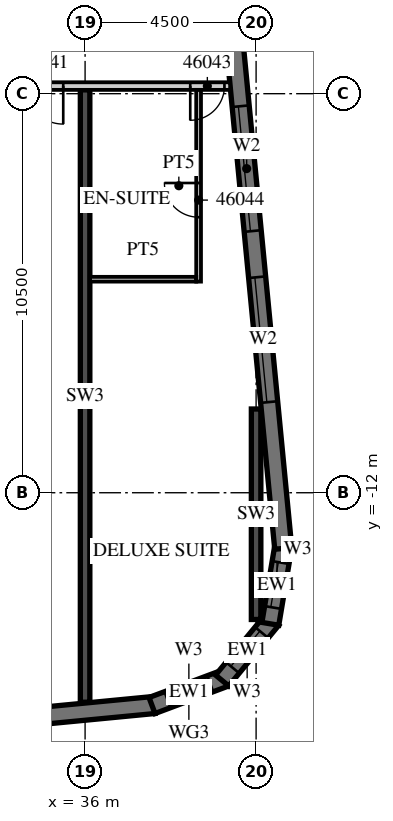
"""IFC4 building model, lengths in metres.
Left out: names, types, materials, properties, quantities, classifications, styles, units other than length and angle.
Written with IfcOpenShell. Run it as: python <this file> out.ifc"""

import sys

from ifc_helpers import new_model, si_unit, direction, frame, frame_2d, origin, place, context, subcontext, project, spatial, polyline, rectangle, outline, extrude, element, fill, save


model = new_model("IFC4")
c1 = context("Model", 3, precision=1e-05, world=origin(), true_north=direction((0.0, 1.0)))
c2 = subcontext(c1, "Body", "Model", "MODEL_VIEW")
j1 = project(units=[si_unit("LENGTHUNIT", "METRE"), si_unit("PLANEANGLEUNIT", "RADIAN")], contexts=[c1])
p1 = place(None, origin())
s1 = spatial("IfcSite", under=j1, at=p1, CompositionType="ELEMENT")
p2 = place(p1, origin())
s2 = spatial("IfcBuilding", under=s1, at=p2, CompositionType="ELEMENT")
p3 = place(p2, frame((0.0, 0.0, 193.3)))
s3 = spatial("IfcBuildingStorey", under=s2, at=p3, CompositionType="ELEMENT", Elevation=193.3)
p4 = place(p3, frame((36.0, -17.512, 0.0), z_axis=(0.0, 0.0, 1.0), x_axis=(0.0, 1.0, 0.0)))
e1 = element("IfcWall", 1, at=p4, inside=s3, PredefinedType="SHEAR", context=c2, shape_type="SweptSolid", body=[
    extrude(rectangle(XDim=16.112, YDim=0.25, at=frame_2d((8.056, 0.0))), origin(), (0.0, 0.0, 1.0), 3.3),
])
p5 = place(p3, frame((40.5, -15.335, 0.0), z_axis=(0.0, 0.0, 1.0), x_axis=(0.0, 1.0, 0.0)))
e2 = element("IfcWall", 2, at=p5, inside=s3, PredefinedType="SHEAR", context=c2, shape_type="SweptSolid", body=[
    extrude(rectangle(XDim=5.538, YDim=0.25, at=frame_2d((2.769, 0.0))), origin(), (0.0, 0.0, 1.0), 3.3),
])
p6 = place(p3, frame((-13.521, -22.529, 0.0), z_axis=(0.0, 0.0, 1.0), x_axis=(0.995396436651, 0.095843277819, 0.0)))
e3 = element("IfcWall", 3, at=p6, inside=s3, PredefinedType="SOLIDWALL", context=c2, shape_type="SweptSolid", body=[
    extrude(rectangle(XDim=51.578, YDim=0.45, at=frame_2d((25.789, 0.0))), origin(), (0.0, 0.0, 1.0), 3.02),
])
p7 = place(p6, frame((0.91, 0.0, 0.45)))
e4 = element("IfcOpeningElement", 4, at=p7, cuts=e3, PredefinedType="OPENING", context=c2, shape_type="SweptSolid", body=[
    extrude(rectangle(XDim=2.7, YDim=2.25, at=frame_2d((1.35, 1.125))), frame((0.0, 0.235, 0.0), z_axis=(0.0, -1.0, 0.0), x_axis=(1.0, 0.0, 0.0)), (0.0, 0.0, 1.0), 0.47),
])
p8 = place(p6, frame((5.431, 0.0, 0.45)))
e5 = element("IfcOpeningElement", 5, at=p8, cuts=e3, PredefinedType="OPENING", context=c2, shape_type="SweptSolid", body=[
    extrude(rectangle(XDim=2.7, YDim=2.25, at=frame_2d((1.35, 1.125))), frame((0.0, 0.235, 0.0), z_axis=(0.0, -1.0, 0.0), x_axis=(1.0, 0.0, 0.0)), (0.0, 0.0, 1.0), 0.47),
])
p9 = place(p6, frame((9.952, 0.0, 0.45)))
e6 = element("IfcOpeningElement", 6, at=p9, cuts=e3, PredefinedType="OPENING", context=c2, shape_type="SweptSolid", body=[
    extrude(rectangle(XDim=2.7, YDim=2.25, at=frame_2d((1.35, 1.125))), frame((0.0, 0.235, 0.0), z_axis=(0.0, -1.0, 0.0), x_axis=(1.0, 0.0, 0.0)), (0.0, 0.0, 1.0), 0.47),
])
p10 = place(p6, frame((14.473, 0.0, 0.45)))
e7 = element("IfcOpeningElement", 7, at=p10, cuts=e3, PredefinedType="OPENING", context=c2, shape_type="SweptSolid", body=[
    extrude(rectangle(XDim=2.7, YDim=2.25, at=frame_2d((1.35, 1.125))), frame((0.0, 0.235, 0.0), z_axis=(0.0, -1.0, 0.0), x_axis=(1.0, 0.0, 0.0)), (0.0, 0.0, 1.0), 0.47),
])
p11 = place(p6, frame((18.994, 0.0, 0.45)))
e8 = element("IfcOpeningElement", 8, at=p11, cuts=e3, PredefinedType="OPENING", context=c2, shape_type="SweptSolid", body=[
    extrude(rectangle(XDim=2.7, YDim=2.25, at=frame_2d((1.35, 1.125))), frame((0.0, 0.235, 0.0), z_axis=(0.0, -1.0, 0.0), x_axis=(1.0, 0.0, 0.0)), (0.0, 0.0, 1.0), 0.47),
])
p12 = place(p6, frame((23.514, 0.0, 0.45)))
e9 = element("IfcOpeningElement", 9, at=p12, cuts=e3, PredefinedType="OPENING", context=c2, shape_type="SweptSolid", body=[
    extrude(rectangle(XDim=2.7, YDim=2.25, at=frame_2d((1.35, 1.125))), frame((0.0, 0.235, 0.0), z_axis=(0.0, -1.0, 0.0), x_axis=(1.0, 0.0, 0.0)), (0.0, 0.0, 1.0), 0.47),
])
p13 = place(p6, frame((28.035, 0.0, 0.45)))
e10 = element("IfcOpeningElement", 10, at=p13, cuts=e3, PredefinedType="OPENING", context=c2, shape_type="SweptSolid", body=[
    extrude(rectangle(XDim=2.7, YDim=2.25, at=frame_2d((1.35, 1.125))), frame((0.0, 0.235, 0.0), z_axis=(0.0, -1.0, 0.0), x_axis=(1.0, 0.0, 0.0)), (0.0, 0.0, 1.0), 0.47),
])
p14 = place(p6, frame((32.556, 0.0, 0.45)))
e11 = element("IfcOpeningElement", 11, at=p14, cuts=e3, PredefinedType="OPENING", context=c2, shape_type="SweptSolid", body=[
    extrude(rectangle(XDim=2.7, YDim=2.25, at=frame_2d((1.35, 1.125))), frame((0.0, 0.235, 0.0), z_axis=(0.0, -1.0, 0.0), x_axis=(1.0, 0.0, 0.0)), (0.0, 0.0, 1.0), 0.47),
])
p15 = place(p6, frame((37.077, 0.0, 0.45)))
e12 = element("IfcOpeningElement", 12, at=p15, cuts=e3, PredefinedType="OPENING", context=c2, shape_type="SweptSolid", body=[
    extrude(rectangle(XDim=2.7, YDim=2.25, at=frame_2d((1.35, 1.125))), frame((0.0, 0.235, 0.0), z_axis=(0.0, -1.0, 0.0), x_axis=(1.0, 0.0, 0.0)), (0.0, 0.0, 1.0), 0.47),
])
p16 = place(p6, frame((41.598, 0.0, 0.45)))
e13 = element("IfcOpeningElement", 13, at=p16, cuts=e3, PredefinedType="OPENING", context=c2, shape_type="SweptSolid", body=[
    extrude(rectangle(XDim=2.7, YDim=2.25, at=frame_2d((1.35, 1.125))), frame((0.0, 0.235, 0.0), z_axis=(0.0, -1.0, 0.0), x_axis=(1.0, 0.0, 0.0)), (0.0, 0.0, 1.0), 0.47),
])
p17 = place(p6, frame((46.119, 0.0, 0.45)))
e14 = element("IfcOpeningElement", 14, at=p17, cuts=e3, PredefinedType="OPENING", context=c2, shape_type="SweptSolid", body=[
    extrude(rectangle(XDim=2.7, YDim=2.25, at=frame_2d((1.35, 1.125))), frame((0.0, 0.235, 0.0), z_axis=(0.0, -1.0, 0.0), x_axis=(1.0, 0.0, 0.0)), (0.0, 0.0, 1.0), 0.47),
])
p18 = place(p3, frame((37.761, -17.598, 0.0), z_axis=(0.0, 0.0, 1.0), x_axis=(0.936677599948, 0.350192909346, 0.0)))
e15 = element("IfcWall", 15, at=p18, inside=s3, PredefinedType="SOLIDWALL", context=c2, shape_type="SweptSolid", body=[
    extrude(outline(polyline([(0.0, -0.225), (2.071, -0.225), (1.95, 0.225), (0.121, 0.225), (0.0, -0.225)])), origin(), (0.0, 0.0, 1.0), 3.02),
])
p19 = place(p18, frame((0.435, 0.0, 0.45)))
e16 = element("IfcOpeningElement", 16, at=p19, cuts=e15, PredefinedType="OPENING", context=c2, shape_type="SweptSolid", body=[
    extrude(rectangle(XDim=1.2, YDim=2.25, at=frame_2d((0.6, 1.125))), frame((0.0, 0.235, 0.0), z_axis=(0.0, -1.0, 0.0), x_axis=(1.0, 0.0, 0.0)), (0.0, 0.0, 1.0), 0.47),
])
p20 = place(p3, frame((39.606, -16.941, 0.0), z_axis=(0.0, 0.0, 1.0), x_axis=(0.636116318187, 0.771593176315, 0.0)))
e17 = element("IfcWall", 17, at=p20, inside=s3, PredefinedType="SOLIDWALL", context=c2, shape_type="SweptSolid", body=[
    extrude(outline(polyline([(0.0, -0.225), (2.071, -0.225), (1.95, 0.225), (0.121, 0.225), (0.0, -0.225)])), origin(), (0.0, 0.0, 1.0), 3.02),
])
p21 = place(p20, frame((0.435, 0.0, 0.45)))
e18 = element("IfcOpeningElement", 18, at=p21, cuts=e17, PredefinedType="OPENING", context=c2, shape_type="SweptSolid", body=[
    extrude(rectangle(XDim=1.2, YDim=2.25, at=frame_2d((0.6, 1.125))), frame((0.0, 0.235, 0.0), z_axis=(0.0, -1.0, 0.0), x_axis=(1.0, 0.0, 0.0)), (0.0, 0.0, 1.0), 0.47),
])
p22 = place(p3, frame((40.875, -15.449, 0.0), z_axis=(0.0, 0.0, 1.0), x_axis=(0.164953448126, 0.986301353518, 0.0)))
e19 = element("IfcWall", 19, at=p22, inside=s3, PredefinedType="SOLIDWALL", context=c2, shape_type="SweptSolid", body=[
    extrude(outline(polyline([(0.0, -0.225), (2.071, -0.225), (1.95, 0.225), (0.121, 0.225), (0.0, -0.225)])), origin(), (0.0, 0.0, 1.0), 3.02),
])
p23 = place(p22, frame((0.435, 0.0, 0.45)))
e20 = element("IfcOpeningElement", 20, at=p23, cuts=e19, PredefinedType="OPENING", context=c2, shape_type="SweptSolid", body=[
    extrude(rectangle(XDim=1.2, YDim=2.25, at=frame_2d((0.6, 1.125))), frame((0.0, 0.235, 0.0), z_axis=(0.0, -1.0, 0.0), x_axis=(1.0, 0.0, 0.0)), (0.0, 0.0, 1.0), 0.47),
])
p24 = place(p3, frame((41.214, -13.466, 0.0), z_axis=(0.0, 0.0, 1.0), x_axis=(-0.095847314626, 0.995396047952, 0.0)))
e21 = element("IfcWall", 21, at=p24, inside=s3, PredefinedType="SOLIDWALL", context=c2, shape_type="SweptSolid", body=[
    extrude(rectangle(XDim=34.0, YDim=0.45, at=frame_2d((17.0, 0.0))), origin(), (0.0, 0.0, 1.0), 3.02),
])
p25 = place(p24, frame((3.869, 0.0, 0.45)))
e22 = element("IfcOpeningElement", 22, at=p25, cuts=e21, PredefinedType="OPENING", context=c2, shape_type="SweptSolid", body=[
    extrude(rectangle(XDim=3.3, YDim=2.25, at=frame_2d((1.65, 1.125))), frame((0.0, 0.235, 0.0), z_axis=(0.0, -1.0, 0.0), x_axis=(1.0, 0.0, 0.0)), (0.0, 0.0, 1.0), 0.47),
])
p26 = place(p24, frame((8.39, 0.0, 0.45)))
e23 = element("IfcOpeningElement", 23, at=p26, cuts=e21, PredefinedType="OPENING", context=c2, shape_type="SweptSolid", body=[
    extrude(rectangle(XDim=3.3, YDim=2.25, at=frame_2d((1.65, 1.125))), frame((0.0, 0.235, 0.0), z_axis=(0.0, -1.0, 0.0), x_axis=(1.0, 0.0, 0.0)), (0.0, 0.0, 1.0), 0.47),
])
p27 = place(p3, frame((13.5, -1.3, 0.0), z_axis=(0.0, 0.0, 1.0), x_axis=(1.0, 0.0, 0.0)))
e24 = element("IfcWall", 24, at=p27, inside=s3, PredefinedType="PARTITIONING", context=c2, shape_type="SweptSolid", body=[
    extrude(rectangle(XDim=26.317, YDim=0.2, at=frame_2d((13.158, 0.0))), origin(), (0.0, 0.0, 1.0), 3.02),
])
p28 = place(p27, frame((0.575, 0.0, 0.0)))
e25 = element("IfcOpeningElement", 25, at=p28, cuts=e24, PredefinedType="OPENING", context=c2, shape_type="SweptSolid", body=[
    extrude(rectangle(XDim=1.0, YDim=2.1, at=frame_2d((0.5, 1.05))), frame((0.0, 0.11, 0.0), z_axis=(0.0, -1.0, 0.0), x_axis=(1.0, 0.0, 0.0)), (0.0, 0.0, 1.0), 0.22),
])
p29 = place(p27, frame((7.45, 0.0, 0.0)))
e26 = element("IfcOpeningElement", 26, at=p29, cuts=e24, PredefinedType="OPENING", context=c2, shape_type="SweptSolid", body=[
    extrude(rectangle(XDim=1.0, YDim=2.1, at=frame_2d((0.5, 1.05))), frame((0.0, 0.11, 0.0), z_axis=(0.0, -1.0, 0.0), x_axis=(1.0, 0.0, 0.0)), (0.0, 0.0, 1.0), 0.22),
])
p30 = place(p27, frame((9.55, 0.0, 0.0)))
e27 = element("IfcOpeningElement", 27, at=p30, cuts=e24, PredefinedType="OPENING", context=c2, shape_type="SweptSolid", body=[
    extrude(rectangle(XDim=1.0, YDim=2.1, at=frame_2d((0.5, 1.05))), frame((0.0, 0.11, 0.0), z_axis=(0.0, -1.0, 0.0), x_axis=(1.0, 0.0, 0.0)), (0.0, 0.0, 1.0), 0.22),
])
p31 = place(p27, frame((16.45, 0.0, 0.0)))
e28 = element("IfcOpeningElement", 28, at=p31, cuts=e24, PredefinedType="OPENING", context=c2, shape_type="SweptSolid", body=[
    extrude(rectangle(XDim=1.0, YDim=2.1, at=frame_2d((0.5, 1.05))), frame((0.0, 0.11, 0.0), z_axis=(0.0, -1.0, 0.0), x_axis=(1.0, 0.0, 0.0)), (0.0, 0.0, 1.0), 0.22),
])
p32 = place(p27, frame((20.925, 0.0, 0.0)))
e29 = element("IfcOpeningElement", 29, at=p32, cuts=e24, PredefinedType="OPENING", context=c2, shape_type="SweptSolid", body=[
    extrude(rectangle(XDim=1.0, YDim=2.1, at=frame_2d((0.5, 1.05))), frame((0.0, 0.11, 0.0), z_axis=(0.0, -1.0, 0.0), x_axis=(1.0, 0.0, 0.0)), (0.0, 0.0, 1.0), 0.22),
])
p33 = place(p27, frame((25.267, 0.0, 0.0)))
e30 = element("IfcOpeningElement", 30, at=p33, cuts=e24, PredefinedType="OPENING", context=c2, shape_type="SweptSolid", body=[
    extrude(rectangle(XDim=0.9, YDim=2.1, at=frame_2d((0.45, 1.05))), frame((0.0, 0.11, 0.0), z_axis=(0.0, -1.0, 0.0), x_axis=(1.0, 0.0, 0.0)), (0.0, 0.0, 1.0), 0.22),
])
p34 = place(p3, frame((38.987, -6.445, 0.0), z_axis=(0.0, 0.0, 1.0), x_axis=(0.0, 1.0, 0.0)))
e31 = element("IfcWall", 31, at=p34, inside=s3, PredefinedType="PARTITIONING", context=c2, shape_type="SweptSolid", body=[
    extrude(rectangle(XDim=5.045, YDim=0.125, at=frame_2d((2.522, 0.0))), origin(), (0.0, 0.0, 1.0), 3.02),
])
p35 = place(p34, frame((1.695, 0.0, 0.0)))
e32 = element("IfcOpeningElement", 32, at=p35, cuts=e31, PredefinedType="OPENING", context=c2, shape_type="SweptSolid", body=[
    extrude(rectangle(XDim=0.9, YDim=2.1, at=frame_2d((0.45, 1.05))), frame((0.0, 0.073, 0.0), z_axis=(0.0, -1.0, 0.0), x_axis=(1.0, 0.0, 0.0)), (0.0, 0.0, 1.0), 0.145),
])
p36 = place(p3, frame((36.125, -6.382, 0.0), z_axis=(0.0, 0.0, 1.0), x_axis=(1.0, 0.0, 0.0)))
e33 = element("IfcWall", 33, at=p36, inside=s3, PredefinedType="PARTITIONING", context=c2, shape_type="SweptSolid", body=[
    extrude(rectangle(XDim=2.8, YDim=0.125, at=frame_2d((1.4, 0.0))), origin(), (0.0, 0.0, 1.0), 3.02),
])
p37 = place(p19, origin())
e34 = element("IfcWindow", 34, at=p37, inside=s3, PartitioningType="SINGLE_PANEL", PredefinedType="WINDOW", context=c2, shape_type="SweptSolid", body=[
    extrude(rectangle(XDim=1.2, YDim=2.25, at=frame_2d((0.6, 1.125))), frame((0.0, 0.09, 0.0), z_axis=(0.0, -1.0, 0.0), x_axis=(1.0, 0.0, 0.0)), (0.0, 0.0, 1.0), 0.06),
])
fill(e16, e34)
p38 = place(p21, origin())
e35 = element("IfcWindow", 35, at=p38, inside=s3, PartitioningType="SINGLE_PANEL", PredefinedType="WINDOW", context=c2, shape_type="SweptSolid", body=[
    extrude(rectangle(XDim=1.2, YDim=2.25, at=frame_2d((0.6, 1.125))), frame((0.0, 0.09, 0.0), z_axis=(0.0, -1.0, 0.0), x_axis=(1.0, 0.0, 0.0)), (0.0, 0.0, 1.0), 0.06),
])
fill(e18, e35)
p39 = place(p23, origin())
e36 = element("IfcWindow", 36, at=p39, inside=s3, PartitioningType="SINGLE_PANEL", PredefinedType="WINDOW", context=c2, shape_type="SweptSolid", body=[
    extrude(rectangle(XDim=1.2, YDim=2.25, at=frame_2d((0.6, 1.125))), frame((0.0, 0.09, 0.0), z_axis=(0.0, -1.0, 0.0), x_axis=(1.0, 0.0, 0.0)), (0.0, 0.0, 1.0), 0.06),
])
fill(e20, e36)
p40 = place(p25, origin())
e37 = element("IfcWindow", 37, at=p40, inside=s3, PartitioningType="SINGLE_PANEL", PredefinedType="WINDOW", context=c2, shape_type="SweptSolid", body=[
    extrude(rectangle(XDim=3.3, YDim=2.25, at=frame_2d((1.65, 1.125))), frame((0.0, 0.09, 0.0), z_axis=(0.0, -1.0, 0.0), x_axis=(1.0, 0.0, 0.0)), (0.0, 0.0, 1.0), 0.06),
])
fill(e22, e37)
p41 = place(p26, origin())
e38 = element("IfcWindow", 38, at=p41, inside=s3, PartitioningType="SINGLE_PANEL", PredefinedType="WINDOW", context=c2, shape_type="SweptSolid", body=[
    extrude(rectangle(XDim=3.3, YDim=2.25, at=frame_2d((1.65, 1.125))), frame((0.0, 0.09, 0.0), z_axis=(0.0, -1.0, 0.0), x_axis=(1.0, 0.0, 0.0)), (0.0, 0.0, 1.0), 0.06),
])
fill(e23, e38)
p42 = place(p32, origin())
e39 = element("IfcDoor", 39, at=p42, inside=s3, OperationType="SINGLE_SWING_RIGHT", PredefinedType="DOOR", context=c2, shape_type="SweptSolid", body=[
    extrude(rectangle(XDim=1.0, YDim=2.1, at=frame_2d((0.5, 1.05))), frame((0.0, 0.025, 0.0), z_axis=(0.0, -1.0, 0.0), x_axis=(1.0, 0.0, 0.0)), (0.0, 0.0, 1.0), 0.05),
])
fill(e29, e39)
p43 = place(p33, origin())
e40 = element("IfcDoor", 40, at=p43, inside=s3, OperationType="SINGLE_SWING_LEFT", PredefinedType="DOOR", context=c2, shape_type="SweptSolid", body=[
    extrude(rectangle(XDim=0.9, YDim=2.1, at=frame_2d((0.45, 1.05))), frame((0.0, 0.025, 0.0), z_axis=(0.0, -1.0, 0.0), x_axis=(1.0, 0.0, 0.0)), (0.0, 0.0, 1.0), 0.05),
])
fill(e30, e40)
p44 = place(p35, origin())
e41 = element("IfcDoor", 41, at=p44, inside=s3, OperationType="SINGLE_SWING_RIGHT", PredefinedType="DOOR", context=c2, shape_type="SweptSolid", body=[
    extrude(rectangle(XDim=0.9, YDim=2.1, at=frame_2d((0.45, 1.05))), frame((0.0, 0.025, 0.0), z_axis=(0.0, -1.0, 0.0), x_axis=(1.0, 0.0, 0.0)), (0.0, 0.0, 1.0), 0.05),
])
fill(e32, e41)
save(model, sys.argv[1])
